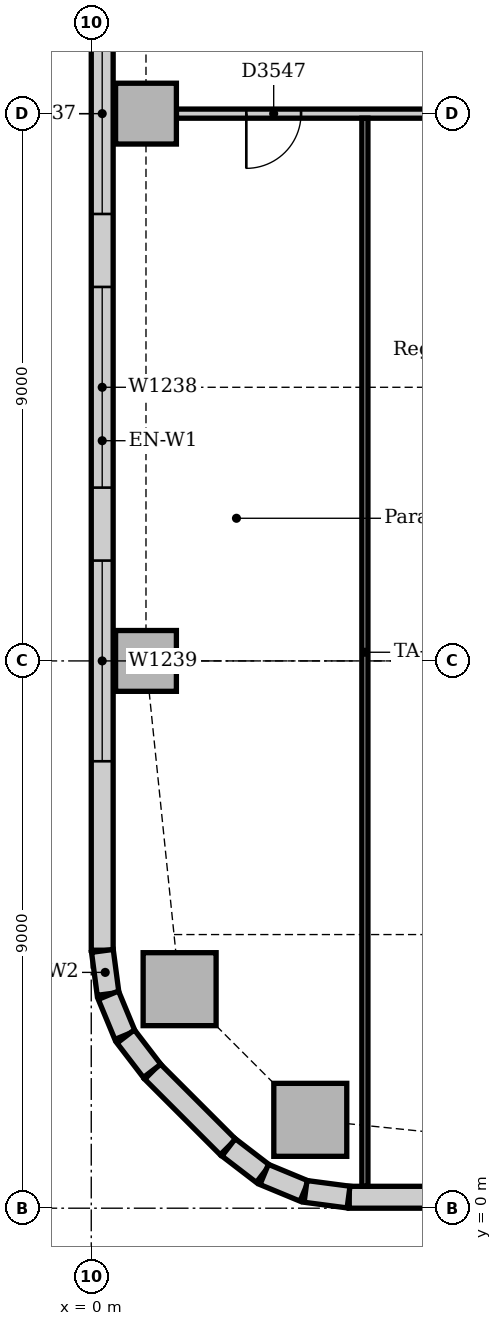
"""IFC4 building model, lengths in metres.
Left out: names, types, materials, properties, quantities, classifications, styles, units other than length and angle.
Written with IfcOpenShell. Run it as: python <this file> out.ifc"""

import sys

from ifc_helpers import new_model, si_unit, direction, frame, frame_2d, origin, origin_2d, place, context, subcontext, project, spatial, rectangle, extrude, element, fill, save


model = new_model("IFC4")
c1 = context("Model", 3, precision=1e-05, world=origin(), true_north=direction((0.0, 1.0)))
c2 = subcontext(c1, "Body", "Model", "MODEL_VIEW")
j1 = project(units=[si_unit("LENGTHUNIT", "METRE"), si_unit("PLANEANGLEUNIT", "RADIAN")], contexts=[c1])
p1 = place(None, origin())
s1 = spatial("IfcSite", under=j1, at=p1, CompositionType="ELEMENT")
p2 = place(p1, origin())
s2 = spatial("IfcBuilding", under=s1, at=p2, CompositionType="ELEMENT")
p3 = place(p2, frame((0.0, 0.0, 59.0)))
s3 = spatial("IfcBuildingStorey", under=s2, at=p3, CompositionType="ELEMENT", Elevation=59.0)
for number, where, z_axis, x_axis in (
    (1, (3.602, 1.453, 0.0), (0.0, 0.0, 1.0), (1.0, 0.0, 0.0)),
    (2, (1.453, 3.602, 0.0), (0.0, 0.0, 1.0), (1.0, 0.0, 0.0)),
):
    element("IfcColumn", number, at=place(p3, frame(where, z_axis=z_axis, x_axis=x_axis)), inside=s3, PredefinedType="COLUMN", context=c2, shape_type="SweptSolid", body=[
        extrude(rectangle(XDim=1.2, YDim=1.2, at=origin_2d()), origin(), (0.0, 0.0, 1.0), 3.85),
    ])
for number, where, z_axis, x_axis in (
    (3, (0.9, 9.0, 0.0), (0.0, 0.0, 1.0), (1.0, 0.0, 0.0)),
    (4, (0.9, 18.0, 0.0), (0.0, 0.0, 1.0), (1.0, 0.0, 0.0)),
):
    element("IfcColumn", number, at=place(p3, frame(where, z_axis=z_axis, x_axis=x_axis)), inside=s3, PredefinedType="COLUMN", context=c2, shape_type="SweptSolid", body=[
        extrude(rectangle(XDim=1.0, YDim=1.0, at=origin_2d()), origin(), (0.0, 0.0, 1.0), 3.85),
    ])
p4 = place(p3, frame((4.243, 0.18, 0.0), z_axis=(0.0, 0.0, 1.0), x_axis=(1.0, 0.0, 0.0)))
e5 = element("IfcWall", 5, at=p4, inside=s3, PredefinedType="STANDARD", context=c2, shape_type="SweptSolid", body=[
    extrude(rectangle(XDim=44.015, YDim=0.36, at=frame_2d((22.007, 0.0))), origin(), (0.0, 0.0, 1.0), 3.85),
])
p5 = place(p4, frame((2.357, 0.0, 0.9)))
e6 = element("IfcOpeningElement", 6, at=p5, cuts=e5, PredefinedType="OPENING", context=c2, shape_type="SweptSolid", body=[
    extrude(rectangle(XDim=3.3, YDim=1.6, at=frame_2d((1.65, 0.8))), frame((0.0, 0.19, 0.0), z_axis=(0.0, -1.0, 0.0), x_axis=(1.0, 0.0, 0.0)), (0.0, 0.0, 1.0), 0.38),
])
p6 = place(p4, frame((7.307, 0.0, 0.9)))
e7 = element("IfcOpeningElement", 7, at=p6, cuts=e5, PredefinedType="OPENING", context=c2, shape_type="SweptSolid", body=[
    extrude(rectangle(XDim=1.8, YDim=1.6, at=frame_2d((0.9, 0.8))), frame((0.0, 0.19, 0.0), z_axis=(0.0, -1.0, 0.0), x_axis=(1.0, 0.0, 0.0)), (0.0, 0.0, 1.0), 0.38),
])
p7 = place(p4, frame((11.357, 0.0, 0.9)))
e8 = element("IfcOpeningElement", 8, at=p7, cuts=e5, PredefinedType="OPENING", context=c2, shape_type="SweptSolid", body=[
    extrude(rectangle(XDim=3.3, YDim=1.6, at=frame_2d((1.65, 0.8))), frame((0.0, 0.19, 0.0), z_axis=(0.0, -1.0, 0.0), x_axis=(1.0, 0.0, 0.0)), (0.0, 0.0, 1.0), 0.38),
])
p8 = place(p4, frame((15.857, 0.0, 0.9)))
e9 = element("IfcOpeningElement", 9, at=p8, cuts=e5, PredefinedType="OPENING", context=c2, shape_type="SweptSolid", body=[
    extrude(rectangle(XDim=3.3, YDim=1.6, at=frame_2d((1.65, 0.8))), frame((0.0, 0.19, 0.0), z_axis=(0.0, -1.0, 0.0), x_axis=(1.0, 0.0, 0.0)), (0.0, 0.0, 1.0), 0.38),
])
p9 = place(p4, frame((20.357, 0.0, 0.9)))
e10 = element("IfcOpeningElement", 10, at=p9, cuts=e5, PredefinedType="OPENING", context=c2, shape_type="SweptSolid", body=[
    extrude(rectangle(XDim=3.3, YDim=1.6, at=frame_2d((1.65, 0.8))), frame((0.0, 0.19, 0.0), z_axis=(0.0, -1.0, 0.0), x_axis=(1.0, 0.0, 0.0)), (0.0, 0.0, 1.0), 0.38),
])
p10 = place(p4, frame((24.857, 0.0, 0.9)))
e11 = element("IfcOpeningElement", 11, at=p10, cuts=e5, PredefinedType="OPENING", context=c2, shape_type="SweptSolid", body=[
    extrude(rectangle(XDim=3.3, YDim=1.6, at=frame_2d((1.65, 0.8))), frame((0.0, 0.19, 0.0), z_axis=(0.0, -1.0, 0.0), x_axis=(1.0, 0.0, 0.0)), (0.0, 0.0, 1.0), 0.38),
])
p11 = place(p4, frame((29.357, 0.0, 0.9)))
e12 = element("IfcOpeningElement", 12, at=p11, cuts=e5, PredefinedType="OPENING", context=c2, shape_type="SweptSolid", body=[
    extrude(rectangle(XDim=3.3, YDim=1.6, at=frame_2d((1.65, 0.8))), frame((0.0, 0.19, 0.0), z_axis=(0.0, -1.0, 0.0), x_axis=(1.0, 0.0, 0.0)), (0.0, 0.0, 1.0), 0.38),
])
p12 = place(p4, frame((34.307, 0.0, 0.9)))
e13 = element("IfcOpeningElement", 13, at=p12, cuts=e5, PredefinedType="OPENING", context=c2, shape_type="SweptSolid", body=[
    extrude(rectangle(XDim=1.8, YDim=1.6, at=frame_2d((0.9, 0.8))), frame((0.0, 0.19, 0.0), z_axis=(0.0, -1.0, 0.0), x_axis=(1.0, 0.0, 0.0)), (0.0, 0.0, 1.0), 0.38),
])
p13 = place(p4, frame((38.357, 0.0, 0.9)))
e14 = element("IfcOpeningElement", 14, at=p13, cuts=e5, PredefinedType="OPENING", context=c2, shape_type="SweptSolid", body=[
    extrude(rectangle(XDim=3.3, YDim=1.6, at=frame_2d((1.65, 0.8))), frame((0.0, 0.19, 0.0), z_axis=(0.0, -1.0, 0.0), x_axis=(1.0, 0.0, 0.0)), (0.0, 0.0, 1.0), 0.38),
])
p14 = place(p3, frame((0.18, 21.0, 0.0), z_axis=(0.0, 0.0, 1.0), x_axis=(0.0, -1.0, 0.0)))
e15 = element("IfcWall", 15, at=p14, inside=s3, PredefinedType="STANDARD", context=c2, shape_type="SweptSolid", body=[
    extrude(rectangle(XDim=16.757, YDim=0.36, at=frame_2d((8.379, 0.0))), origin(), (0.0, 0.0, 1.0), 3.85),
])
p15 = place(p14, frame((1.35, 0.0, 0.9)))
e16 = element("IfcOpeningElement", 16, at=p15, cuts=e15, PredefinedType="OPENING", context=c2, shape_type="SweptSolid", body=[
    extrude(rectangle(XDim=3.3, YDim=1.6, at=frame_2d((1.65, 0.8))), frame((0.0, 0.19, 0.0), z_axis=(0.0, -1.0, 0.0), x_axis=(1.0, 0.0, 0.0)), (0.0, 0.0, 1.0), 0.38),
])
p16 = place(p14, frame((5.85, 0.0, 0.9)))
e17 = element("IfcOpeningElement", 17, at=p16, cuts=e15, PredefinedType="OPENING", context=c2, shape_type="SweptSolid", body=[
    extrude(rectangle(XDim=3.3, YDim=1.6, at=frame_2d((1.65, 0.8))), frame((0.0, 0.19, 0.0), z_axis=(0.0, -1.0, 0.0), x_axis=(1.0, 0.0, 0.0)), (0.0, 0.0, 1.0), 0.38),
])
p17 = place(p14, frame((10.35, 0.0, 0.9)))
e18 = element("IfcOpeningElement", 18, at=p17, cuts=e15, PredefinedType="OPENING", context=c2, shape_type="SweptSolid", body=[
    extrude(rectangle(XDim=3.3, YDim=1.6, at=frame_2d((1.65, 0.8))), frame((0.0, 0.19, 0.0), z_axis=(0.0, -1.0, 0.0), x_axis=(1.0, 0.0, 0.0)), (0.0, 0.0, 1.0), 0.38),
])
p18 = place(p3, frame((1.006, 2.249, 0.0), z_axis=(0.0, 0.0, 1.0), x_axis=(0.707106781187, -0.707106781187, 0.0)))
e19 = element("IfcWall", 19, at=p18, inside=s3, PredefinedType="STANDARD", context=c2, shape_type="SweptSolid", body=[
    extrude(rectangle(XDim=1.757, YDim=0.36, at=frame_2d((0.879, 0.0))), origin(), (0.0, 0.0, 1.0), 3.85),
])
for number, where, z_axis, x_axis in (
    (20, (0.183, 4.231, 0.0), (0.0, 0.0, 1.0), (0.131, -0.991, 0.0)),
    (21, (0.282, 3.503, 0.0), (0.0, 0.0, 1.0), (0.383, -0.924, 0.0)),
):
    element("IfcWall", number, at=place(p3, frame(where, z_axis=z_axis, x_axis=x_axis)), inside=s3, PredefinedType="STANDARD", context=c2, shape_type="SweptSolid", body=[
        extrude(rectangle(XDim=0.713, YDim=0.36, at=frame_2d((0.356, 0.0))), origin(), (0.0, 0.0, 1.0), 3.85),
    ])
for number, where, z_axis, x_axis in (
    (22, (0.566, 2.825, 0.0), (0.0, 0.0, 1.0), (0.609, -0.793, 0.0)),
    (23, (2.259, 1.0, 0.0), (0.0, 0.0, 1.0), (0.793, -0.609, 0.0)),
):
    element("IfcWall", number, at=place(p3, frame(where, z_axis=z_axis, x_axis=x_axis)), inside=s3, PredefinedType="STANDARD", context=c2, shape_type="SweptSolid", body=[
        extrude(rectangle(XDim=0.713, YDim=0.36, at=frame_2d((0.357, 0.0))), origin(), (0.0, 0.0, 1.0), 3.85),
    ])
for number, where, z_axis, x_axis in (
    (24, (2.844, 0.555, 0.0), (0.0, 0.0, 1.0), (0.924, -0.383, 0.0)),
    (25, (3.524, 0.276, 0.0), (0.0, 0.0, 1.0), (0.991, -0.131, 0.0)),
):
    element("IfcWall", number, at=place(p3, frame(where, z_axis=z_axis, x_axis=x_axis)), inside=s3, PredefinedType="STANDARD", context=c2, shape_type="SweptSolid", body=[
        extrude(rectangle(XDim=0.713, YDim=0.36, at=frame_2d((0.356, 0.0))), origin(), (0.0, 0.0, 1.0), 3.85),
    ])
p19 = place(p3, frame((1.4, 18.0, 0.0), z_axis=(0.0, 0.0, 1.0), x_axis=(1.0, 0.0, 0.0)))
e26 = element("IfcWall", 26, at=p19, inside=s3, PredefinedType="PARTITIONING", context=c2, shape_type="SweptSolid", body=[
    extrude(rectangle(XDim=7.1, YDim=0.15, at=frame_2d((3.55, 0.0))), origin(), (0.0, 0.0, 1.0), 3.15),
])
p20 = place(p19, frame((1.15, 0.0, 0.0)))
e27 = element("IfcOpeningElement", 27, at=p20, cuts=e26, PredefinedType="OPENING", context=c2, shape_type="SweptSolid", body=[
    extrude(rectangle(XDim=0.9, YDim=2.1, at=frame_2d((0.45, 1.05))), frame((0.0, 0.085, 0.0), z_axis=(0.0, -1.0, 0.0), x_axis=(1.0, 0.0, 0.0)), (0.0, 0.0, 1.0), 0.17),
])
p21 = place(p19, frame((4.55, 0.0, 0.0)))
e28 = element("IfcOpeningElement", 28, at=p21, cuts=e26, PredefinedType="OPENING", context=c2, shape_type="SweptSolid", body=[
    extrude(rectangle(XDim=0.9, YDim=2.1, at=frame_2d((0.45, 1.05))), frame((0.0, 0.085, 0.0), z_axis=(0.0, -1.0, 0.0), x_axis=(1.0, 0.0, 0.0)), (0.0, 0.0, 1.0), 0.17),
])
p22 = place(p3, frame((4.5, 0.36, 0.0), z_axis=(0.0, 0.0, 1.0), x_axis=(0.0, 1.0, 0.0)))
e29 = element("IfcWall", 29, at=p22, inside=s3, PredefinedType="PARTITIONING", context=c2, shape_type="SweptSolid", body=[
    extrude(rectangle(XDim=17.565, YDim=0.1, at=frame_2d((8.783, 0.0))), origin(), (0.0, 0.0, 1.0), 3.85),
])
p23 = place(p15, origin())
e30 = element("IfcWindow", 30, at=p23, inside=s3, PartitioningType="SINGLE_PANEL", PredefinedType="WINDOW", context=c2, shape_type="SweptSolid", body=[
    extrude(rectangle(XDim=3.3, YDim=1.6, at=frame_2d((1.65, 0.8))), frame((0.0, 0.13, 0.0), z_axis=(0.0, -1.0, 0.0), x_axis=(1.0, 0.0, 0.0)), (0.0, 0.0, 1.0), 0.06),
])
fill(e16, e30)
p24 = place(p16, origin())
e31 = element("IfcWindow", 31, at=p24, inside=s3, PartitioningType="SINGLE_PANEL", PredefinedType="WINDOW", context=c2, shape_type="SweptSolid", body=[
    extrude(rectangle(XDim=3.3, YDim=1.6, at=frame_2d((1.65, 0.8))), frame((0.0, 0.13, 0.0), z_axis=(0.0, -1.0, 0.0), x_axis=(1.0, 0.0, 0.0)), (0.0, 0.0, 1.0), 0.06),
])
fill(e17, e31)
p25 = place(p17, origin())
e32 = element("IfcWindow", 32, at=p25, inside=s3, PartitioningType="SINGLE_PANEL", PredefinedType="WINDOW", context=c2, shape_type="SweptSolid", body=[
    extrude(rectangle(XDim=3.3, YDim=1.6, at=frame_2d((1.65, 0.8))), frame((0.0, 0.13, 0.0), z_axis=(0.0, -1.0, 0.0), x_axis=(1.0, 0.0, 0.0)), (0.0, 0.0, 1.0), 0.06),
])
fill(e18, e32)
p26 = place(p20, frame((0.9, 0.0, 0.0), z_axis=(0.0, 0.0, 1.0), x_axis=(-1.0, 0.0, 0.0)))
e33 = element("IfcDoor", 33, at=p26, inside=s3, OperationType="SINGLE_SWING_RIGHT", PredefinedType="DOOR", context=c2, shape_type="SweptSolid", body=[
    extrude(rectangle(XDim=0.9, YDim=2.1, at=frame_2d((0.45, 1.05))), frame((0.0, 0.025, 0.0), z_axis=(0.0, -1.0, 0.0), x_axis=(1.0, 0.0, 0.0)), (0.0, 0.0, 1.0), 0.05),
])
fill(e27, e33)
save(model, sys.argv[1])
